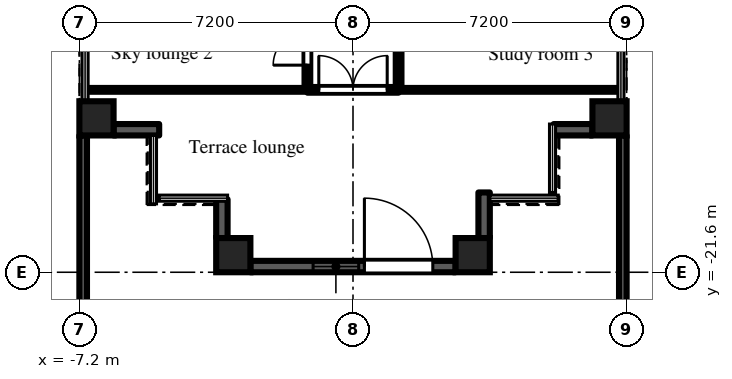
"""IFC4 building model, lengths in metres.
Left out: names, types, materials, properties, quantities, classifications, styles, units other than length and angle.
Written with IfcOpenShell. Run it as: python <this file> out.ifc"""

import sys

from ifc_helpers import new_model, si_unit, direction, frame, frame_2d, origin, origin_2d, place, context, subcontext, project, spatial, rectangle, extrude, element, fill, save


model = new_model("IFC4")
c1 = context("Model", 3, precision=1e-05, world=origin(), true_north=direction((0.0, 1.0)))
c2 = subcontext(c1, "Body", "Model", "MODEL_VIEW")
j1 = project(units=[si_unit("LENGTHUNIT", "METRE"), si_unit("PLANEANGLEUNIT", "RADIAN")], contexts=[c1])
p1 = place(None, origin())
s1 = spatial("IfcSite", under=j1, at=p1, CompositionType="ELEMENT")
p2 = place(p1, origin())
s2 = spatial("IfcBuilding", under=s1, at=p2, CompositionType="ELEMENT")
p3 = place(p2, frame((0.0, 0.0, 116.1)))
s3 = spatial("IfcBuildingStorey", under=s2, at=p3, CompositionType="ELEMENT", Elevation=116.1)
for number, where, z_axis, x_axis in (
    (1, (-6.75, -17.55, 0.0), (0.0, 0.0, 1.0), (1.0, 0.0, 0.0)),
    (2, (-3.15, -21.15, 0.0), (0.0, 0.0, 1.0), (1.0, 0.0, 0.0)),
    (3, (3.15, -21.15, 0.0), (0.0, 0.0, 1.0), (1.0, 0.0, 0.0)),
    (4, (6.75, -17.55, 0.0), (0.0, 0.0, 1.0), (1.0, 0.0, 0.0)),
):
    element("IfcColumn", number, at=place(p3, frame(where, z_axis=z_axis, x_axis=x_axis)), inside=s3, PredefinedType="COLUMN", context=c2, shape_type="SweptSolid", body=[
        extrude(rectangle(XDim=0.9, YDim=0.9, at=origin_2d()), origin(), (0.0, 0.0, 1.0), 4.2),
    ])
p4 = place(p3, frame((-6.3, -17.85, 0.0), z_axis=(0.0, 0.0, 1.0), x_axis=(1.0, 0.0, 0.0)))
e5 = element("IfcWall", 5, at=p4, inside=s3, PredefinedType="SOLIDWALL", context=c2, shape_type="SweptSolid", body=[
    extrude(rectangle(XDim=1.2, YDim=0.3, at=frame_2d((0.6, 0.0))), origin(), (0.0, 0.0, 1.0), 3.8),
])
p5 = place(p3, frame((-3.45, -19.68, 0.0), z_axis=(0.0, 0.0, 1.0), x_axis=(0.0, -1.0, 0.0)))
e6 = element("IfcWall", 6, at=p5, inside=s3, PredefinedType="SOLIDWALL", context=c2, shape_type="SweptSolid", body=[
    extrude(rectangle(XDim=1.02, YDim=0.3, at=frame_2d((0.51, 0.0))), origin(), (0.0, 0.0, 1.0), 3.8),
])
p6 = place(p3, frame((-2.7, -21.45, 0.0), z_axis=(0.0, 0.0, 1.0), x_axis=(1.0, 0.0, 0.0)))
e7 = element("IfcWall", 7, at=p6, inside=s3, PredefinedType="SOLIDWALL", context=c2, shape_type="SweptSolid", body=[
    extrude(rectangle(XDim=5.4, YDim=0.3, at=frame_2d((2.7, 0.0))), origin(), (0.0, 0.0, 1.0), 3.4),
])
p7 = place(p6, frame((3.0, 0.0, 0.0)))
e8 = element("IfcOpeningElement", 8, at=p7, cuts=e7, PredefinedType="OPENING", context=c2, shape_type="SweptSolid", body=[
    extrude(rectangle(XDim=1.8, YDim=2.05, at=frame_2d((0.9, 1.025))), frame((0.0, 0.16, 0.0), z_axis=(0.0, -1.0, 0.0), x_axis=(1.0, 0.0, 0.0)), (0.0, 0.0, 1.0), 0.32),
])
p8 = place(p6, frame((1.65, 0.0, 0.2)))
e9 = element("IfcOpeningElement", 9, at=p8, cuts=e7, PredefinedType="OPENING", context=c2, shape_type="SweptSolid", body=[
    extrude(rectangle(XDim=1.2, YDim=1.85, at=frame_2d((0.6, 0.925))), frame((0.0, 0.16, 0.0), z_axis=(0.0, -1.0, 0.0), x_axis=(1.0, 0.0, 0.0)), (0.0, 0.0, 1.0), 0.32),
])
p9 = place(p3, frame((3.45, -20.7, 0.0), z_axis=(0.0, 0.0, 1.0), x_axis=(0.0, 1.0, 0.0)))
e10 = element("IfcWall", 10, at=p9, inside=s3, PredefinedType="SOLIDWALL", context=c2, shape_type="SweptSolid", body=[
    extrude(rectangle(XDim=1.2, YDim=0.3, at=frame_2d((0.6, 0.0))), origin(), (0.0, 0.0, 1.0), 3.8),
])
p10 = place(p3, frame((5.28, -17.85, 0.0), z_axis=(0.0, 0.0, 1.0), x_axis=(1.0, 0.0, 0.0)))
e11 = element("IfcWall", 11, at=p10, inside=s3, PredefinedType="SOLIDWALL", context=c2, shape_type="SweptSolid", body=[
    extrude(rectangle(XDim=1.02, YDim=0.3, at=frame_2d((0.51, 0.0))), origin(), (0.0, 0.0, 1.0), 3.8),
])
p11 = place(p3, frame((-7.1, -18.0, 0.0), z_axis=(0.0, 0.0, 1.0), x_axis=(0.0, -1.0, 0.0)))
e12 = element("IfcWall", 12, at=p11, inside=s3, PredefinedType="PARAPET", context=c2, shape_type="SweptSolid", body=[
    extrude(rectangle(XDim=21.4, YDim=0.2, at=frame_2d((10.7, 0.0))), origin(), (0.0, 0.0, 1.0), 1.1),
])
p12 = place(p3, frame((7.1, -39.6, 0.0), z_axis=(0.0, 0.0, 1.0), x_axis=(0.0, 1.0, 0.0)))
e13 = element("IfcWall", 13, at=p12, inside=s3, PredefinedType="PARAPET", context=c2, shape_type="SweptSolid", body=[
    extrude(rectangle(XDim=21.6, YDim=0.2, at=frame_2d((10.8, 0.0))), origin(), (0.0, 0.0, 1.0), 1.1),
])
p13 = place(p3, frame((-7.02, -16.8, 0.0), z_axis=(0.0, 0.0, 1.0), x_axis=(1.0, 0.0, 0.0)))
e14 = element("IfcWall", 14, at=p13, inside=s3, PredefinedType="PARTITIONING", context=c2, shape_type="SweptSolid", body=[
    extrude(rectangle(XDim=5.82, YDim=0.1, at=frame_2d((2.91, 0.0))), origin(), (0.0, 0.0, 1.0), 3.8),
])
p14 = place(p3, frame((-1.2, -16.725, 0.0), z_axis=(0.0, 0.0, 1.0), x_axis=(0.0, 1.0, 0.0)))
e15 = element("IfcWall", 15, at=p14, inside=s3, PredefinedType="PARTITIONING", context=c2, shape_type="SweptSolid", body=[
    extrude(rectangle(XDim=9.45, YDim=0.15, at=frame_2d((4.725, 0.0))), origin(), (0.0, 0.0, 1.0), 3.8),
])
p15 = place(p14, frame((0.575, 0.0, 0.0)))
e16 = element("IfcOpeningElement", 16, at=p15, cuts=e15, PredefinedType="OPENING", context=c2, shape_type="SweptSolid", body=[
    extrude(rectangle(XDim=1.8, YDim=2.1, at=frame_2d((0.9, 1.05))), frame((0.0, 0.085, 0.0), z_axis=(0.0, -1.0, 0.0), x_axis=(1.0, 0.0, 0.0)), (0.0, 0.0, 1.0), 0.17),
])
p16 = place(p14, frame((3.825, 0.0, 0.0)))
e17 = element("IfcOpeningElement", 17, at=p16, cuts=e15, PredefinedType="OPENING", context=c2, shape_type="SweptSolid", body=[
    extrude(rectangle(XDim=1.8, YDim=2.1, at=frame_2d((0.9, 1.05))), frame((0.0, 0.085, 0.0), z_axis=(0.0, -1.0, 0.0), x_axis=(1.0, 0.0, 0.0)), (0.0, 0.0, 1.0), 0.17),
])
p17 = place(p14, frame((6.875, 0.0, 0.0)))
e18 = element("IfcOpeningElement", 18, at=p17, cuts=e15, PredefinedType="OPENING", context=c2, shape_type="SweptSolid", body=[
    extrude(rectangle(XDim=1.8, YDim=2.1, at=frame_2d((0.9, 1.05))), frame((0.0, 0.085, 0.0), z_axis=(0.0, -1.0, 0.0), x_axis=(1.0, 0.0, 0.0)), (0.0, 0.0, 1.0), 0.17),
])
p18 = place(p3, frame((-1.2, -16.8, 0.0), z_axis=(0.0, 0.0, 1.0), x_axis=(1.0, 0.0, 0.0)))
e19 = element("IfcWall", 19, at=p18, inside=s3, PredefinedType="PARTITIONING", context=c2, shape_type="SweptSolid", body=[
    extrude(rectangle(XDim=2.4, YDim=0.15, at=frame_2d((1.2, 0.0))), origin(), (0.0, 0.0, 1.0), 3.8),
])
p19 = place(p18, frame((0.3, 0.0, 0.0)))
e20 = element("IfcOpeningElement", 20, at=p19, cuts=e19, PredefinedType="OPENING", context=c2, shape_type="SweptSolid", body=[
    extrude(rectangle(XDim=1.8, YDim=2.1, at=frame_2d((0.9, 1.05))), frame((0.0, 0.085, 0.0), z_axis=(0.0, -1.0, 0.0), x_axis=(1.0, 0.0, 0.0)), (0.0, 0.0, 1.0), 0.17),
])
p20 = place(p3, frame((1.2, -16.725, 0.0), z_axis=(0.0, 0.0, 1.0), x_axis=(0.0, 1.0, 0.0)))
e21 = element("IfcWall", 21, at=p20, inside=s3, PredefinedType="PARTITIONING", context=c2, shape_type="SweptSolid", body=[
    extrude(rectangle(XDim=9.45, YDim=0.15, at=frame_2d((4.725, 0.0))), origin(), (0.0, 0.0, 1.0), 3.8),
])
p21 = place(p20, frame((6.625, 0.0, 0.0)))
e22 = element("IfcOpeningElement", 22, at=p21, cuts=e21, PredefinedType="OPENING", context=c2, shape_type="SweptSolid", body=[
    extrude(rectangle(XDim=1.0, YDim=2.1, at=frame_2d((0.5, 1.05))), frame((0.0, 0.085, 0.0), z_axis=(0.0, -1.0, 0.0), x_axis=(1.0, 0.0, 0.0)), (0.0, 0.0, 1.0), 0.17),
])
p22 = place(p20, frame((1.825, 0.0, 0.0)))
e23 = element("IfcOpeningElement", 23, at=p22, cuts=e21, PredefinedType="OPENING", context=c2, shape_type="SweptSolid", body=[
    extrude(rectangle(XDim=1.0, YDim=2.1, at=frame_2d((0.5, 1.05))), frame((0.0, 0.085, 0.0), z_axis=(0.0, -1.0, 0.0), x_axis=(1.0, 0.0, 0.0)), (0.0, 0.0, 1.0), 0.17),
])
p23 = place(p3, frame((1.2, -16.8, 0.0), z_axis=(0.0, 0.0, 1.0), x_axis=(1.0, 0.0, 0.0)))
e24 = element("IfcWall", 24, at=p23, inside=s3, PredefinedType="PARTITIONING", context=c2, shape_type="SweptSolid", body=[
    extrude(rectangle(XDim=5.82, YDim=0.1, at=frame_2d((2.91, 0.0))), origin(), (0.0, 0.0, 1.0), 3.8),
])
p24 = place(p7, origin())
e25 = element("IfcDoor", 25, at=p24, inside=s3, OperationType="SINGLE_SWING_LEFT", PredefinedType="DOOR", context=c2, shape_type="SweptSolid", body=[
    extrude(rectangle(XDim=1.8, YDim=2.05, at=frame_2d((0.9, 1.025))), frame((0.0, 0.025, 0.0), z_axis=(0.0, -1.0, 0.0), x_axis=(1.0, 0.0, 0.0)), (0.0, 0.0, 1.0), 0.05),
])
fill(e8, e25)
p25 = place(p8, origin())
e26 = element("IfcWindow", 26, at=p25, inside=s3, PartitioningType="SINGLE_PANEL", PredefinedType="WINDOW", context=c2, shape_type="SweptSolid", body=[
    extrude(rectangle(XDim=1.2, YDim=1.85, at=frame_2d((0.6, 0.925))), frame((0.0, 0.03, 0.0), z_axis=(0.0, -1.0, 0.0), x_axis=(1.0, 0.0, 0.0)), (0.0, 0.0, 1.0), 0.06),
])
fill(e9, e26)
p26 = place(p19, origin())
e27 = element("IfcDoor", 27, at=p26, inside=s3, OperationType="DOUBLE_DOOR_DOUBLE_SWING", PredefinedType="DOOR", context=c2, shape_type="SweptSolid", body=[
    extrude(rectangle(XDim=1.8, YDim=2.1, at=frame_2d((0.9, 1.05))), frame((0.0, 0.025, 0.0), z_axis=(0.0, -1.0, 0.0), x_axis=(1.0, 0.0, 0.0)), (0.0, 0.0, 1.0), 0.05),
])
fill(e20, e27)
p27 = place(p15, origin())
e28 = element("IfcDoor", 28, at=p27, inside=s3, OperationType="DOUBLE_DOOR_DOUBLE_SWING", PredefinedType="DOOR", context=c2, shape_type="SweptSolid", body=[
    extrude(rectangle(XDim=1.8, YDim=2.1, at=frame_2d((0.9, 1.05))), frame((0.0, 0.025, 0.0), z_axis=(0.0, -1.0, 0.0), x_axis=(1.0, 0.0, 0.0)), (0.0, 0.0, 1.0), 0.05),
])
fill(e16, e28)
save(model, sys.argv[1])
